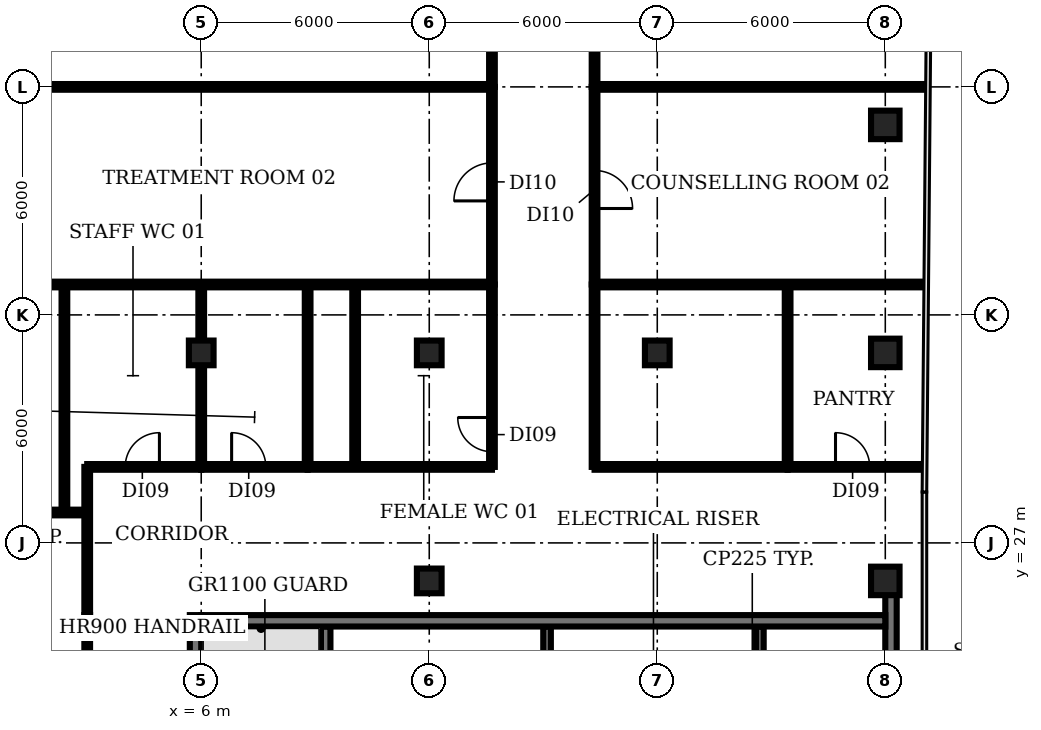
"""IFC4 building model, lengths in metres.
Left out: names, types, materials, properties, quantities, classifications, styles, units other than length and angle.
Written with IfcOpenShell. Run it as: python <this file> out.ifc"""

import sys

from ifc_helpers import new_model, si_unit, direction, frame, frame_2d, origin, origin_2d, place, context, subcontext, project, spatial, rectangle, extrude, element, fill, save


model = new_model("IFC4")
c1 = context("Model", 3, precision=1e-05, world=origin(), true_north=direction((0.0, 1.0)))
c2 = subcontext(c1, "Body", "Model", "MODEL_VIEW")
j1 = project(units=[si_unit("LENGTHUNIT", "METRE"), si_unit("PLANEANGLEUNIT", "RADIAN")], contexts=[c1])
p1 = place(None, origin())
s1 = spatial("IfcSite", under=j1, at=p1, CompositionType="ELEMENT")
p2 = place(p1, origin())
s2 = spatial("IfcBuilding", under=s1, at=p2, CompositionType="ELEMENT")
p3 = place(p2, frame((0.0, 0.0, 285.2)))
s3 = spatial("IfcBuildingStorey", under=s2, at=p3, CompositionType="ELEMENT", Elevation=285.2)
for number, where, z_axis, x_axis in (
    (1, (6.0, 32.0, 0.0), (0.0, 0.0, 1.0), (1.0, 0.0, 0.0)),
    (2, (12.0, 26.0, 0.0), (0.0, 0.0, 1.0), (1.0, 0.0, 0.0)),
    (3, (12.0, 32.0, 0.0), (0.0, 0.0, 1.0), (1.0, 0.0, 0.0)),
    (4, (18.0, 32.0, 0.0), (0.0, 0.0, 1.0), (1.0, 0.0, 0.0)),
):
    element("IfcColumn", number, at=place(p3, frame(where, z_axis=z_axis, x_axis=x_axis)), inside=s3, PredefinedType="COLUMN", context=c2, shape_type="SweptSolid", body=[
        extrude(rectangle(XDim=0.65, YDim=0.65, at=origin_2d()), origin(), (0.0, 0.0, 1.0), 3.85),
    ])
for number, where, z_axis, x_axis in (
    (5, (24.0, 26.0, 0.0), (0.0, 0.0, 1.0), (1.0, 0.0, 0.0)),
    (6, (24.0, 32.0, 0.0), (0.0, 0.0, 1.0), (1.0, 0.0, 0.0)),
    (7, (24.0, 38.0, 0.0), (0.0, 0.0, 1.0), (1.0, 0.0, 0.0)),
):
    element("IfcColumn", number, at=place(p3, frame(where, z_axis=z_axis, x_axis=x_axis)), inside=s3, PredefinedType="COLUMN", context=c2, shape_type="SweptSolid", body=[
        extrude(rectangle(XDim=0.75, YDim=0.75, at=origin_2d()), origin(), (0.0, 0.0, 1.0), 3.85),
    ])
p4 = place(p3, frame((9.275, 18.375, 0.0), z_axis=(0.0, 0.0, 1.0), x_axis=(0.0, 1.0, 0.0)))
e8 = element("IfcWall", 8, at=p4, inside=s3, PredefinedType="SHEAR", context=c2, shape_type="SweptSolid", body=[
    extrude(rectangle(XDim=6.425, YDim=0.25, at=frame_2d((3.212, 0.0))), origin(), (0.0, 0.0, 1.0), 3.85),
])
for number, where, z_axis, x_axis in (
    (9, (15.1, 22.9, 0.0), (0.0, 0.0, 1.0), (0.0, 1.0, 0.0)),
    (10, (20.7, 22.9, 0.0), (0.0, 0.0, 1.0), (0.0, 1.0, 0.0)),
):
    element("IfcWall", number, at=place(p3, frame(where, z_axis=z_axis, x_axis=x_axis)), inside=s3, PredefinedType="SHEAR", context=c2, shape_type="SweptSolid", body=[
        extrude(rectangle(XDim=1.9, YDim=0.2, at=frame_2d((0.95, 0.0))), origin(), (0.0, 0.0, 1.0), 3.85),
    ])
p5 = place(p3, frame((5.85, 5.1, 0.0), z_axis=(0.0, 0.0, 1.0), x_axis=(0.0, 1.0, 0.0)))
e11 = element("IfcWall", 11, at=p5, inside=s3, PredefinedType="SHEAR", context=c2, shape_type="SweptSolid", body=[
    extrude(rectangle(XDim=20.0, YDim=0.3, at=frame_2d((10.0, 0.0))), origin(), (0.0, 0.0, 1.0), 3.85),
])
p6 = place(p5, frame((0.55, 0.0, 0.0)))
e12 = element("IfcOpeningElement", 12, at=p6, cuts=e11, PredefinedType="OPENING", context=c2, shape_type="SweptSolid", body=[
    extrude(rectangle(XDim=1.5, YDim=2.1, at=frame_2d((0.75, 1.05))), frame((0.0, 0.16, 0.0), z_axis=(0.0, -1.0, 0.0), x_axis=(1.0, 0.0, 0.0)), (0.0, 0.0, 1.0), 0.32),
])
p7 = place(p5, frame((7.0, 0.0, 0.0)))
e13 = element("IfcOpeningElement", 13, at=p7, cuts=e11, PredefinedType="OPENING", context=c2, shape_type="SweptSolid", body=[
    extrude(rectangle(XDim=1.2, YDim=2.1, at=frame_2d((0.6, 1.05))), frame((0.0, 0.16, 0.0), z_axis=(0.0, -1.0, 0.0), x_axis=(1.0, 0.0, 0.0)), (0.0, 0.0, 1.0), 0.32),
])
p8 = place(p5, frame((13.55, 0.0, 0.0)))
e14 = element("IfcOpeningElement", 14, at=p8, cuts=e11, PredefinedType="OPENING", context=c2, shape_type="SweptSolid", body=[
    extrude(rectangle(XDim=1.2, YDim=2.1, at=frame_2d((0.6, 1.05))), frame((0.0, 0.16, 0.0), z_axis=(0.0, -1.0, 0.0), x_axis=(1.0, 0.0, 0.0)), (0.0, 0.0, 1.0), 0.32),
])
p9 = place(p3, frame((24.15, 25.655, 0.0), z_axis=(0.0, 0.0, 1.0), x_axis=(0.0, -1.0, 0.0)))
e15 = element("IfcWall", 15, at=p9, inside=s3, PredefinedType="SHEAR", context=c2, shape_type="SweptSolid", body=[
    extrude(rectangle(XDim=20.555, YDim=0.3, at=frame_2d((10.277, 0.0))), origin(), (0.0, 0.0, 1.0), 3.85),
])
p10 = place(p9, frame((18.505, 0.0, 0.0)))
e16 = element("IfcOpeningElement", 16, at=p10, cuts=e15, PredefinedType="OPENING", context=c2, shape_type="SweptSolid", body=[
    extrude(rectangle(XDim=1.5, YDim=2.1, at=frame_2d((0.75, 1.05))), frame((0.0, 0.16, 0.0), z_axis=(0.0, -1.0, 0.0), x_axis=(1.0, 0.0, 0.0)), (0.0, 0.0, 1.0), 0.32),
])
p11 = place(p9, frame((12.405, 0.0, 0.0)))
e17 = element("IfcOpeningElement", 17, at=p11, cuts=e15, PredefinedType="OPENING", context=c2, shape_type="SweptSolid", body=[
    extrude(rectangle(XDim=0.9, YDim=2.1, at=frame_2d((0.45, 1.05))), frame((0.0, 0.16, 0.0), z_axis=(0.0, -1.0, 0.0), x_axis=(1.0, 0.0, 0.0)), (0.0, 0.0, 1.0), 0.32),
])
p12 = place(p9, frame((6.405, 0.0, 0.0)))
e18 = element("IfcOpeningElement", 18, at=p12, cuts=e15, PredefinedType="OPENING", context=c2, shape_type="SweptSolid", body=[
    extrude(rectangle(XDim=2.0, YDim=2.1, at=frame_2d((1.0, 1.05))), frame((0.0, 0.16, 0.0), z_axis=(0.0, -1.0, 0.0), x_axis=(1.0, 0.0, 0.0)), (0.0, 0.0, 1.0), 0.32),
])
p13 = place(p3, frame((6.0, 24.95, 0.0), z_axis=(0.0, 0.0, 1.0), x_axis=(1.0, 0.0, 0.0)))
e19 = element("IfcWall", 19, at=p13, inside=s3, PredefinedType="SHEAR", context=c2, shape_type="SweptSolid", body=[
    extrude(rectangle(XDim=18.0, YDim=0.3, at=frame_2d((9.0, 0.0))), origin(), (0.0, 0.0, 1.0), 3.85),
])
p14 = place(p3, frame((-0.99, 27.8, 0.0), z_axis=(0.0, 0.0, 1.0), x_axis=(1.0, 0.0, 0.0)))
e20 = element("IfcWall", 20, at=p14, inside=s3, PredefinedType="PARTITIONING", context=c2, shape_type="SweptSolid", body=[
    extrude(rectangle(XDim=3.99, YDim=0.15, at=frame_2d((1.995, 0.0))), origin(), (0.0, 0.0, 1.0), 2.9),
])
for number, where, z_axis, x_axis in (
    (21, (-0.98, 33.8, 0.0), (0.0, 0.0, 1.0), (1.0, 0.0, 0.0)),
    (22, (-0.98, 39.0, 0.0), (0.0, 0.0, 1.0), (1.0, 0.0, 0.0)),
):
    element("IfcWall", number, at=place(p3, frame(where, z_axis=z_axis, x_axis=x_axis)), inside=s3, PredefinedType="PARTITIONING", context=c2, shape_type="SweptSolid", body=[
        extrude(rectangle(XDim=14.63, YDim=0.15, at=frame_2d((7.315, 0.0))), origin(), (0.0, 0.0, 1.0), 2.9),
    ])
p15 = place(p3, frame((2.4, 27.8, 0.0), z_axis=(0.0, 0.0, 1.0), x_axis=(0.0, 1.0, 0.0)))
e23 = element("IfcWall", 23, at=p15, inside=s3, PredefinedType="PARTITIONING", context=c2, shape_type="SweptSolid", body=[
    extrude(rectangle(XDim=6.0, YDim=0.15, at=frame_2d((3.0, 0.0))), origin(), (0.0, 0.0, 1.0), 2.9),
])
p16 = place(p3, frame((3.0, 5.1, 0.0), z_axis=(0.0, 0.0, 1.0), x_axis=(0.0, 1.0, 0.0)))
e24 = element("IfcWall", 24, at=p16, inside=s3, PredefinedType="PARTITIONING", context=c2, shape_type="SweptSolid", body=[
    extrude(rectangle(XDim=20.0, YDim=0.15, at=frame_2d((10.0, 0.0))), origin(), (0.0, 0.0, 1.0), 2.9),
])
p17 = place(p16, frame((9.3, 0.0, 0.0)))
e25 = element("IfcOpeningElement", 25, at=p17, cuts=e24, PredefinedType="OPENING", context=c2, shape_type="SweptSolid", body=[
    extrude(rectangle(XDim=1.2, YDim=2.1, at=frame_2d((0.6, 1.05))), frame((0.0, 0.085, 0.0), z_axis=(0.0, -1.0, 0.0), x_axis=(1.0, 0.0, 0.0)), (0.0, 0.0, 1.0), 0.17),
])
p18 = place(p3, frame((3.0, 25.1, 0.0), z_axis=(0.0, 0.0, 1.0), x_axis=(0.0, 1.0, 0.0)))
e26 = element("IfcWall", 26, at=p18, inside=s3, PredefinedType="PARTITIONING", context=c2, shape_type="SweptSolid", body=[
    extrude(rectangle(XDim=3.9, YDim=0.15, at=frame_2d((1.95, 0.0))), origin(), (0.0, 0.0, 1.0), 2.9),
])
p19 = place(p3, frame((3.0, 29.0, 0.0), z_axis=(0.0, 0.0, 1.0), x_axis=(1.0, 0.0, 0.0)))
e27 = element("IfcWall", 27, at=p19, inside=s3, PredefinedType="PARTITIONING", context=c2, shape_type="SweptSolid", body=[
    extrude(rectangle(XDim=3.0, YDim=0.15, at=frame_2d((1.5, 0.0))), origin(), (0.0, 0.0, 1.0), 2.9),
])
p20 = place(p19, frame((1.0, 0.0, 0.0)))
e28 = element("IfcOpeningElement", 28, at=p20, cuts=e27, PredefinedType="OPENING", context=c2, shape_type="SweptSolid", body=[
    extrude(rectangle(XDim=0.9, YDim=2.1, at=frame_2d((0.45, 1.05))), frame((0.0, 0.085, 0.0), z_axis=(0.0, -1.0, 0.0), x_axis=(1.0, 0.0, 0.0)), (0.0, 0.0, 1.0), 0.17),
])
p21 = place(p3, frame((6.0, 29.0, 0.0), z_axis=(0.0, 0.0, 1.0), x_axis=(0.0, 1.0, 0.0)))
e29 = element("IfcWall", 29, at=p21, inside=s3, PredefinedType="PARTITIONING", context=c2, shape_type="SweptSolid", body=[
    extrude(rectangle(XDim=4.8, YDim=0.15, at=frame_2d((2.4, 0.0))), origin(), (0.0, 0.0, 1.0), 2.9),
])
p22 = place(p3, frame((6.0, 29.0, 0.0), z_axis=(0.0, 0.0, 1.0), x_axis=(1.0, 0.0, 0.0)))
e30 = element("IfcWall", 30, at=p22, inside=s3, PredefinedType="PARTITIONING", context=c2, shape_type="SweptSolid", body=[
    extrude(rectangle(XDim=2.8, YDim=0.15, at=frame_2d((1.4, 0.0))), origin(), (0.0, 0.0, 1.0), 2.9),
])
p23 = place(p22, frame((0.8, 0.0, 0.0)))
e31 = element("IfcOpeningElement", 31, at=p23, cuts=e30, PredefinedType="OPENING", context=c2, shape_type="SweptSolid", body=[
    extrude(rectangle(XDim=0.9, YDim=2.1, at=frame_2d((0.45, 1.05))), frame((0.0, 0.085, 0.0), z_axis=(0.0, -1.0, 0.0), x_axis=(1.0, 0.0, 0.0)), (0.0, 0.0, 1.0), 0.17),
])
p24 = place(p3, frame((8.8, 29.0, 0.0), z_axis=(0.0, 0.0, 1.0), x_axis=(0.0, 1.0, 0.0)))
e32 = element("IfcWall", 32, at=p24, inside=s3, PredefinedType="PARTITIONING", context=c2, shape_type="SweptSolid", body=[
    extrude(rectangle(XDim=4.8, YDim=0.15, at=frame_2d((2.4, 0.0))), origin(), (0.0, 0.0, 1.0), 2.9),
])
p25 = place(p3, frame((8.8, 29.0, 0.0), z_axis=(0.0, 0.0, 1.0), x_axis=(1.0, 0.0, 0.0)))
e33 = element("IfcWall", 33, at=p25, inside=s3, PredefinedType="PARTITIONING", context=c2, shape_type="SweptSolid", body=[
    extrude(rectangle(XDim=4.85, YDim=0.15, at=frame_2d((2.425, 0.0))), origin(), (0.0, 0.0, 1.0), 2.9),
])
p26 = place(p3, frame((10.05, 29.0, 0.0), z_axis=(0.0, 0.0, 1.0), x_axis=(0.0, 1.0, 0.0)))
e34 = element("IfcWall", 34, at=p26, inside=s3, PredefinedType="PARTITIONING", context=c2, shape_type="SweptSolid", body=[
    extrude(rectangle(XDim=4.8, YDim=0.15, at=frame_2d((2.4, 0.0))), origin(), (0.0, 0.0, 1.0), 2.9),
])
p27 = place(p3, frame((13.65, 29.0, 0.0), z_axis=(0.0, 0.0, 1.0), x_axis=(0.0, 1.0, 0.0)))
e35 = element("IfcWall", 35, at=p27, inside=s3, PredefinedType="PARTITIONING", context=c2, shape_type="SweptSolid", body=[
    extrude(rectangle(XDim=4.8, YDim=0.15, at=frame_2d((2.4, 0.0))), origin(), (0.0, 0.0, 1.0), 2.9),
])
p28 = place(p27, frame((0.4, 0.0, 0.0)))
e36 = element("IfcOpeningElement", 36, at=p28, cuts=e35, PredefinedType="OPENING", context=c2, shape_type="SweptSolid", body=[
    extrude(rectangle(XDim=0.9, YDim=2.1, at=frame_2d((0.45, 1.05))), frame((0.0, 0.085, 0.0), z_axis=(0.0, -1.0, 0.0), x_axis=(1.0, 0.0, 0.0)), (0.0, 0.0, 1.0), 0.17),
])
p29 = place(p3, frame((13.65, 33.8, 0.0), z_axis=(0.0, 0.0, 1.0), x_axis=(0.0, 1.0, 0.0)))
e37 = element("IfcWall", 37, at=p29, inside=s3, PredefinedType="PARTITIONING", context=c2, shape_type="SweptSolid", body=[
    extrude(rectangle(XDim=5.2, YDim=0.15, at=frame_2d((2.6, 0.0))), origin(), (0.0, 0.0, 1.0), 2.9),
])
p30 = place(p29, frame((2.2, 0.0, 0.0)))
e38 = element("IfcOpeningElement", 38, at=p30, cuts=e37, PredefinedType="OPENING", context=c2, shape_type="SweptSolid", body=[
    extrude(rectangle(XDim=1.0, YDim=2.1, at=frame_2d((0.5, 1.05))), frame((0.0, 0.085, 0.0), z_axis=(0.0, -1.0, 0.0), x_axis=(1.0, 0.0, 0.0)), (0.0, 0.0, 1.0), 0.17),
])
p31 = place(p3, frame((13.65, 39.0, 0.0), z_axis=(0.0, 0.0, 1.0), x_axis=(0.0, 1.0, 0.0)))
e39 = element("IfcWall", 39, at=p31, inside=s3, PredefinedType="PARTITIONING", context=c2, shape_type="SweptSolid", body=[
    extrude(rectangle(XDim=6.0, YDim=0.15, at=frame_2d((3.0, 0.0))), origin(), (0.0, 0.0, 1.0), 2.9),
])
p32 = place(p31, frame((2.4, 0.0, 0.0)))
e40 = element("IfcOpeningElement", 40, at=p32, cuts=e39, PredefinedType="OPENING", context=c2, shape_type="SweptSolid", body=[
    extrude(rectangle(XDim=1.0, YDim=2.1, at=frame_2d((0.5, 1.05))), frame((0.0, 0.085, 0.0), z_axis=(0.0, -1.0, 0.0), x_axis=(1.0, 0.0, 0.0)), (0.0, 0.0, 1.0), 0.17),
])
p33 = place(p3, frame((16.35, 29.0, 0.0), z_axis=(0.0, 0.0, 1.0), x_axis=(0.0, 1.0, 0.0)))
e41 = element("IfcWall", 41, at=p33, inside=s3, PredefinedType="PARTITIONING", context=c2, shape_type="SweptSolid", body=[
    extrude(rectangle(XDim=4.8, YDim=0.15, at=frame_2d((2.4, 0.0))), origin(), (0.0, 0.0, 1.0), 2.9),
])
p34 = place(p3, frame((16.35, 29.0, 0.0), z_axis=(0.0, 0.0, 1.0), x_axis=(1.0, 0.0, 0.0)))
e42 = element("IfcWall", 42, at=p34, inside=s3, PredefinedType="PARTITIONING", context=c2, shape_type="SweptSolid", body=[
    extrude(rectangle(XDim=5.08, YDim=0.15, at=frame_2d((2.54, 0.0))), origin(), (0.0, 0.0, 1.0), 2.9),
])
p35 = place(p3, frame((16.35, 33.8, 0.0), z_axis=(0.0, 0.0, 1.0), x_axis=(1.0, 0.0, 0.0)))
e43 = element("IfcWall", 43, at=p35, inside=s3, PredefinedType="PARTITIONING", context=c2, shape_type="SweptSolid", body=[
    extrude(rectangle(XDim=8.68, YDim=0.15, at=frame_2d((4.34, 0.0))), origin(), (0.0, 0.0, 1.0), 2.9),
])
p36 = place(p3, frame((16.35, 39.0, 0.0), z_axis=(0.0, 0.0, 1.0), x_axis=(0.0, -1.0, 0.0)))
e44 = element("IfcWall", 44, at=p36, inside=s3, PredefinedType="PARTITIONING", context=c2, shape_type="SweptSolid", body=[
    extrude(rectangle(XDim=5.2, YDim=0.15, at=frame_2d((2.6, 0.0))), origin(), (0.0, 0.0, 1.0), 2.9),
])
p37 = place(p36, frame((2.2, 0.0, 0.0)))
e45 = element("IfcOpeningElement", 45, at=p37, cuts=e44, PredefinedType="OPENING", context=c2, shape_type="SweptSolid", body=[
    extrude(rectangle(XDim=1.0, YDim=2.1, at=frame_2d((0.5, 1.05))), frame((0.0, 0.085, 0.0), z_axis=(0.0, -1.0, 0.0), x_axis=(1.0, 0.0, 0.0)), (0.0, 0.0, 1.0), 0.17),
])
p38 = place(p3, frame((16.35, 39.0, 0.0), z_axis=(0.0, 0.0, 1.0), x_axis=(1.0, 0.0, 0.0)))
e46 = element("IfcWall", 46, at=p38, inside=s3, PredefinedType="PARTITIONING", context=c2, shape_type="SweptSolid", body=[
    extrude(rectangle(XDim=8.72, YDim=0.15, at=frame_2d((4.36, 0.0))), origin(), (0.0, 0.0, 1.0), 2.9),
])
p39 = place(p3, frame((16.35, 57.0, 0.0), z_axis=(0.0, 0.0, 1.0), x_axis=(0.0, -1.0, 0.0)))
e47 = element("IfcWall", 47, at=p39, inside=s3, PredefinedType="PARTITIONING", context=c2, shape_type="SweptSolid", body=[
    extrude(rectangle(XDim=18.0, YDim=0.15, at=frame_2d((9.0, 0.0))), origin(), (0.0, 0.0, 1.0), 2.9),
])
p40 = place(p39, frame((8.5, 0.0, 0.0)))
e48 = element("IfcOpeningElement", 48, at=p40, cuts=e47, PredefinedType="OPENING", context=c2, shape_type="SweptSolid", body=[
    extrude(rectangle(XDim=1.2, YDim=2.1, at=frame_2d((0.6, 1.05))), frame((0.0, 0.085, 0.0), z_axis=(0.0, -1.0, 0.0), x_axis=(1.0, 0.0, 0.0)), (0.0, 0.0, 1.0), 0.17),
])
p41 = place(p3, frame((21.43, 29.0, 0.0), z_axis=(0.0, 0.0, 1.0), x_axis=(0.0, 1.0, 0.0)))
e49 = element("IfcWall", 49, at=p41, inside=s3, PredefinedType="PARTITIONING", context=c2, shape_type="SweptSolid", body=[
    extrude(rectangle(XDim=4.8, YDim=0.15, at=frame_2d((2.4, 0.0))), origin(), (0.0, 0.0, 1.0), 2.9),
])
p42 = place(p3, frame((21.43, 29.0, 0.0), z_axis=(0.0, 0.0, 1.0), x_axis=(1.0, 0.0, 0.0)))
e50 = element("IfcWall", 50, at=p42, inside=s3, PredefinedType="PARTITIONING", context=c2, shape_type="SweptSolid", body=[
    extrude(rectangle(XDim=3.56, YDim=0.15, at=frame_2d((1.78, 0.0))), origin(), (0.0, 0.0, 1.0), 2.9),
])
p43 = place(p42, frame((1.26, 0.0, 0.0)))
e51 = element("IfcOpeningElement", 51, at=p43, cuts=e50, PredefinedType="OPENING", context=c2, shape_type="SweptSolid", body=[
    extrude(rectangle(XDim=0.9, YDim=2.1, at=frame_2d((0.45, 1.05))), frame((0.0, 0.085, 0.0), z_axis=(0.0, -1.0, 0.0), x_axis=(1.0, 0.0, 0.0)), (0.0, 0.0, 1.0), 0.17),
])
p44 = place(p20, origin())
e52 = element("IfcDoor", 52, at=p44, inside=s3, OperationType="SINGLE_SWING_RIGHT", PredefinedType="DOOR", context=c2, shape_type="SweptSolid", body=[
    extrude(rectangle(XDim=0.9, YDim=2.1, at=frame_2d((0.45, 1.05))), frame((0.0, 0.025, 0.0), z_axis=(0.0, -1.0, 0.0), x_axis=(1.0, 0.0, 0.0)), (0.0, 0.0, 1.0), 0.05),
])
fill(e28, e52)
p45 = place(p23, origin())
e53 = element("IfcDoor", 53, at=p45, inside=s3, OperationType="SINGLE_SWING_LEFT", PredefinedType="DOOR", context=c2, shape_type="SweptSolid", body=[
    extrude(rectangle(XDim=0.9, YDim=2.1, at=frame_2d((0.45, 1.05))), frame((0.0, 0.025, 0.0), z_axis=(0.0, -1.0, 0.0), x_axis=(1.0, 0.0, 0.0)), (0.0, 0.0, 1.0), 0.05),
])
fill(e31, e53)
p46 = place(p28, origin())
e54 = element("IfcDoor", 54, at=p46, inside=s3, OperationType="SINGLE_SWING_RIGHT", PredefinedType="DOOR", context=c2, shape_type="SweptSolid", body=[
    extrude(rectangle(XDim=0.9, YDim=2.1, at=frame_2d((0.45, 1.05))), frame((0.0, 0.025, 0.0), z_axis=(0.0, -1.0, 0.0), x_axis=(1.0, 0.0, 0.0)), (0.0, 0.0, 1.0), 0.05),
])
fill(e36, e54)
p47 = place(p30, origin())
e55 = element("IfcDoor", 55, at=p47, inside=s3, OperationType="SINGLE_SWING_LEFT", PredefinedType="DOOR", context=c2, shape_type="SweptSolid", body=[
    extrude(rectangle(XDim=1.0, YDim=2.1, at=frame_2d((0.5, 1.05))), frame((0.0, 0.025, 0.0), z_axis=(0.0, -1.0, 0.0), x_axis=(1.0, 0.0, 0.0)), (0.0, 0.0, 1.0), 0.05),
])
fill(e38, e55)
p48 = place(p37, origin())
e56 = element("IfcDoor", 56, at=p48, inside=s3, OperationType="SINGLE_SWING_RIGHT", PredefinedType="DOOR", context=c2, shape_type="SweptSolid", body=[
    extrude(rectangle(XDim=1.0, YDim=2.1, at=frame_2d((0.5, 1.05))), frame((0.0, 0.025, 0.0), z_axis=(0.0, -1.0, 0.0), x_axis=(1.0, 0.0, 0.0)), (0.0, 0.0, 1.0), 0.05),
])
fill(e45, e56)
p49 = place(p43, origin())
e57 = element("IfcDoor", 57, at=p49, inside=s3, OperationType="SINGLE_SWING_LEFT", PredefinedType="DOOR", context=c2, shape_type="SweptSolid", body=[
    extrude(rectangle(XDim=0.9, YDim=2.1, at=frame_2d((0.45, 1.05))), frame((0.0, 0.025, 0.0), z_axis=(0.0, -1.0, 0.0), x_axis=(1.0, 0.0, 0.0)), (0.0, 0.0, 1.0), 0.05),
])
fill(e51, e57)
save(model, sys.argv[1])
